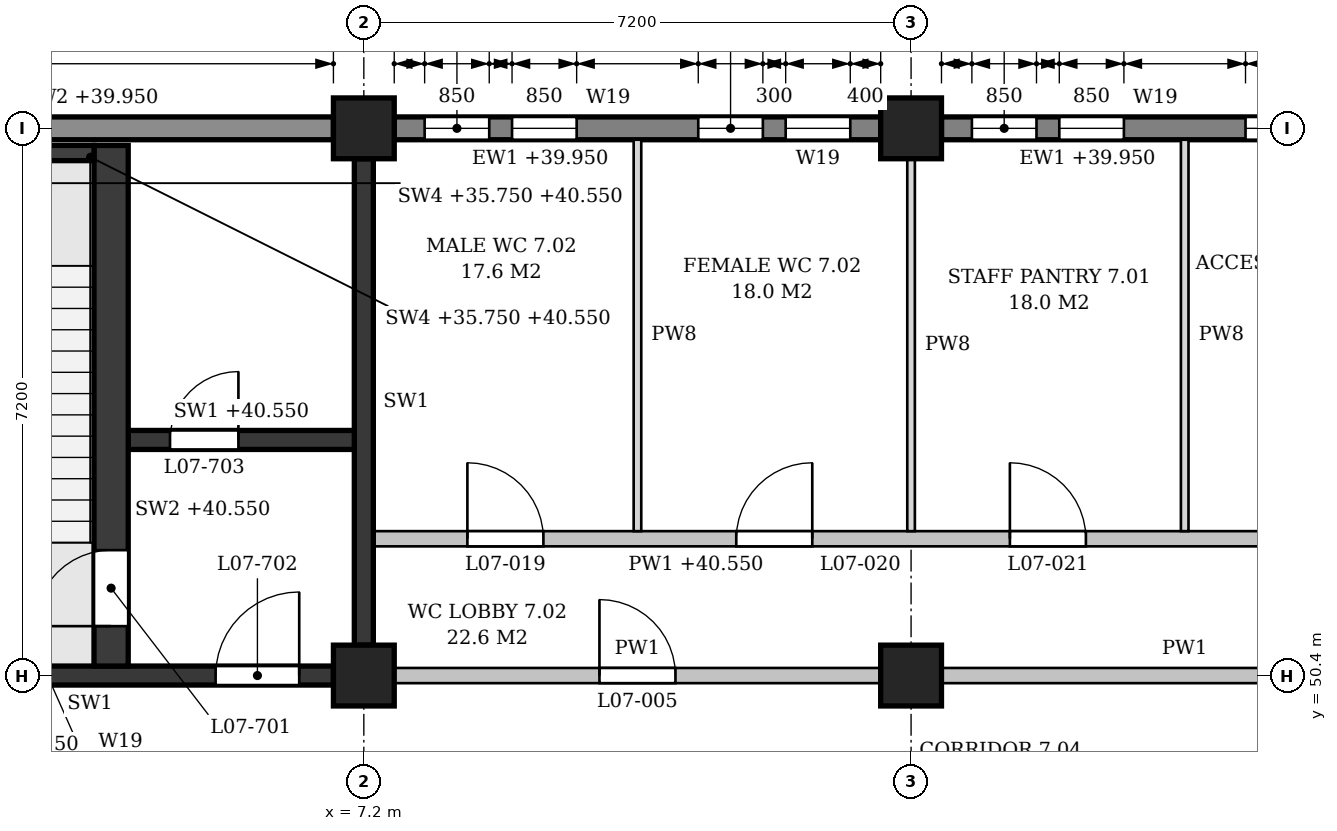
"""IFC4 building model, lengths in metres.
Left out: names, types, materials, properties, quantities, classifications, styles, units other than length and angle.
Written with IfcOpenShell. Run it as: python <this file> out.ifc"""

import sys

from ifc_helpers import new_model, si_unit, direction, frame, frame_2d, origin, origin_2d, place, context, subcontext, project, spatial, polyline, rectangle, outline, extrude, element, fill, save


model = new_model("IFC4")
c1 = context("Model", 3, precision=1e-05, world=origin(), true_north=direction((0.0, 1.0)))
c2 = subcontext(c1, "Body", "Model", "MODEL_VIEW")
j1 = project(units=[si_unit("LENGTHUNIT", "METRE"), si_unit("PLANEANGLEUNIT", "RADIAN")], contexts=[c1])
p1 = place(None, origin())
s1 = spatial("IfcSite", under=j1, at=p1, CompositionType="ELEMENT")
p2 = place(p1, origin())
s2 = spatial("IfcBuilding", under=s1, at=p2, CompositionType="ELEMENT")
p3 = place(p2, frame((0.0, 0.0, 36.0)))
s3 = spatial("IfcBuildingStorey", under=s2, at=p3, CompositionType="ELEMENT", Elevation=36.0)
for number, where, z_axis, x_axis in (
    (1, (7.2, 50.4, 0.0), (0.0, 0.0, 1.0), (1.0, 0.0, 0.0)),
    (2, (7.2, 57.6, 0.0), (0.0, 0.0, 1.0), (1.0, 0.0, 0.0)),
    (3, (14.4, 50.4, 0.0), (0.0, 0.0, 1.0), (1.0, 0.0, 0.0)),
    (4, (14.4, 57.6, 0.0), (0.0, 0.0, 1.0), (1.0, 0.0, 0.0)),
):
    element("IfcColumn", number, at=place(p3, frame(where, z_axis=z_axis, x_axis=x_axis)), inside=s3, PredefinedType="COLUMN", context=c2, shape_type="SweptSolid", body=[
        extrude(rectangle(XDim=0.8, YDim=0.8, at=origin_2d()), origin(), (0.0, 0.0, 1.0), 4.8),
    ])
p4 = place(p3, frame((21.2, 57.6, 0.0), z_axis=(0.0, 0.0, 1.0), x_axis=(-1.0, 0.0, 0.0)))
e5 = element("IfcWall", 5, at=p4, inside=s3, PredefinedType="STANDARD", context=c2, shape_type="SweptSolid", body=[
    extrude(rectangle(XDim=6.4, YDim=0.3, at=frame_2d((3.2, 0.0))), origin(), (0.0, 0.0, 1.0), 3.95),
])
p5 = place(p4, frame((0.4, 0.0, 0.9)))
e6 = element("IfcOpeningElement", 6, at=p5, cuts=e5, PredefinedType="OPENING", context=c2, shape_type="SweptSolid", body=[
    extrude(outline(polyline([(0.0, 0.0), (0.85, 0.0), (0.85, 2.55), (0.425, 3.0), (0.0, 2.55), (0.0, 0.0)])), frame((0.0, 0.16, 0.0), z_axis=(0.0, -1.0, 0.0), x_axis=(1.0, 0.0, 0.0)), (0.0, 0.0, 1.0), 0.32),
])
p6 = place(p4, frame((1.55, 0.0, 0.9)))
e7 = element("IfcOpeningElement", 7, at=p6, cuts=e5, PredefinedType="OPENING", context=c2, shape_type="SweptSolid", body=[
    extrude(outline(polyline([(0.0, 0.0), (0.85, 0.0), (0.85, 2.55), (0.425, 3.0), (0.0, 2.55), (0.0, 0.0)])), frame((0.0, 0.16, 0.0), z_axis=(0.0, -1.0, 0.0), x_axis=(1.0, 0.0, 0.0)), (0.0, 0.0, 1.0), 0.32),
])
p7 = place(p4, frame((4.0, 0.0, 0.9)))
e8 = element("IfcOpeningElement", 8, at=p7, cuts=e5, PredefinedType="OPENING", context=c2, shape_type="SweptSolid", body=[
    extrude(outline(polyline([(0.0, 0.0), (0.85, 0.0), (0.85, 2.55), (0.425, 3.0), (0.0, 2.55), (0.0, 0.0)])), frame((0.0, 0.16, 0.0), z_axis=(0.0, -1.0, 0.0), x_axis=(1.0, 0.0, 0.0)), (0.0, 0.0, 1.0), 0.32),
])
p8 = place(p4, frame((5.15, 0.0, 0.9)))
e9 = element("IfcOpeningElement", 9, at=p8, cuts=e5, PredefinedType="OPENING", context=c2, shape_type="SweptSolid", body=[
    extrude(outline(polyline([(0.0, 0.0), (0.85, 0.0), (0.85, 2.55), (0.425, 3.0), (0.0, 2.55), (0.0, 0.0)])), frame((0.0, 0.16, 0.0), z_axis=(0.0, -1.0, 0.0), x_axis=(1.0, 0.0, 0.0)), (0.0, 0.0, 1.0), 0.32),
])
p9 = place(p3, frame((14.0, 57.6, 0.0), z_axis=(0.0, 0.0, 1.0), x_axis=(-1.0, 0.0, 0.0)))
e10 = element("IfcWall", 10, at=p9, inside=s3, PredefinedType="STANDARD", context=c2, shape_type="SweptSolid", body=[
    extrude(rectangle(XDim=6.4, YDim=0.3, at=frame_2d((3.2, 0.0))), origin(), (0.0, 0.0, 1.0), 3.95),
])
p10 = place(p9, frame((0.4, 0.0, 0.9)))
e11 = element("IfcOpeningElement", 11, at=p10, cuts=e10, PredefinedType="OPENING", context=c2, shape_type="SweptSolid", body=[
    extrude(outline(polyline([(0.0, 0.0), (0.85, 0.0), (0.85, 2.55), (0.425, 3.0), (0.0, 2.55), (0.0, 0.0)])), frame((0.0, 0.16, 0.0), z_axis=(0.0, -1.0, 0.0), x_axis=(1.0, 0.0, 0.0)), (0.0, 0.0, 1.0), 0.32),
])
p11 = place(p9, frame((1.55, 0.0, 0.9)))
e12 = element("IfcOpeningElement", 12, at=p11, cuts=e10, PredefinedType="OPENING", context=c2, shape_type="SweptSolid", body=[
    extrude(outline(polyline([(0.0, 0.0), (0.85, 0.0), (0.85, 2.55), (0.425, 3.0), (0.0, 2.55), (0.0, 0.0)])), frame((0.0, 0.16, 0.0), z_axis=(0.0, -1.0, 0.0), x_axis=(1.0, 0.0, 0.0)), (0.0, 0.0, 1.0), 0.32),
])
p12 = place(p9, frame((4.0, 0.0, 0.9)))
e13 = element("IfcOpeningElement", 13, at=p12, cuts=e10, PredefinedType="OPENING", context=c2, shape_type="SweptSolid", body=[
    extrude(outline(polyline([(0.0, 0.0), (0.85, 0.0), (0.85, 2.55), (0.425, 3.0), (0.0, 2.55), (0.0, 0.0)])), frame((0.0, 0.16, 0.0), z_axis=(0.0, -1.0, 0.0), x_axis=(1.0, 0.0, 0.0)), (0.0, 0.0, 1.0), 0.32),
])
p13 = place(p9, frame((5.15, 0.0, 0.9)))
e14 = element("IfcOpeningElement", 14, at=p13, cuts=e10, PredefinedType="OPENING", context=c2, shape_type="SweptSolid", body=[
    extrude(outline(polyline([(0.0, 0.0), (0.85, 0.0), (0.85, 2.55), (0.425, 3.0), (0.0, 2.55), (0.0, 0.0)])), frame((0.0, 0.16, 0.0), z_axis=(0.0, -1.0, 0.0), x_axis=(1.0, 0.0, 0.0)), (0.0, 0.0, 1.0), 0.32),
])
p14 = place(p3, frame((6.8, 57.6, 0.0), z_axis=(0.0, 0.0, 1.0), x_axis=(-1.0, 0.0, 0.0)))
e15 = element("IfcWall", 15, at=p14, inside=s3, PredefinedType="STANDARD", context=c2, shape_type="SweptSolid", body=[
    extrude(rectangle(XDim=6.4, YDim=0.3, at=frame_2d((3.2, 0.0))), origin(), (0.0, 0.0, 1.0), 3.95),
])
p15 = place(p14, frame((4.55, 0.0, 0.9)))
e16 = element("IfcOpeningElement", 16, at=p15, cuts=e15, PredefinedType="OPENING", context=c2, shape_type="SweptSolid", body=[
    extrude(outline(polyline([(0.0, 0.0), (0.9, 0.0), (0.9, 2.55), (0.45, 3.0), (0.0, 2.55), (0.0, 0.0)])), frame((0.0, 0.16, 0.0), z_axis=(0.0, -1.0, 0.0), x_axis=(1.0, 0.0, 0.0)), (0.0, 0.0, 1.0), 0.32),
])
p16 = place(p3, frame((0.4, 50.4, 0.0), z_axis=(0.0, 0.0, 1.0), x_axis=(1.0, 0.0, 0.0)))
e17 = element("IfcWall", 17, at=p16, inside=s3, PredefinedType="SHEAR", context=c2, shape_type="SweptSolid", body=[
    extrude(rectangle(XDim=6.4, YDim=0.25, at=frame_2d((3.2, 0.0))), origin(), (0.0, 0.0, 1.0), 3.85),
])
p17 = place(p16, frame((4.85, 0.0, 0.0)))
e18 = element("IfcOpeningElement", 18, at=p17, cuts=e17, PredefinedType="OPENING", context=c2, shape_type="SweptSolid", body=[
    extrude(rectangle(XDim=1.1, YDim=2.1, at=frame_2d((0.55, 1.05))), frame((0.0, 0.135, 0.0), z_axis=(0.0, -1.0, 0.0), x_axis=(1.0, 0.0, 0.0)), (0.0, 0.0, 1.0), 0.27),
])
p18 = place(p3, frame((7.2, 50.8, 0.0), z_axis=(0.0, 0.0, 1.0), x_axis=(0.0, 1.0, 0.0)))
e19 = element("IfcWall", 19, at=p18, inside=s3, PredefinedType="SHEAR", context=c2, shape_type="SweptSolid", body=[
    extrude(rectangle(XDim=6.4, YDim=0.25, at=frame_2d((3.2, 0.0))), origin(), (0.0, 0.0, 1.0), 3.85),
])
p19 = place(p3, frame((2.25, 57.275, -0.25), z_axis=(0.0, 0.0, 1.0), x_axis=(1.0, 0.0, 0.0)))
e20 = element("IfcWall", 20, at=p19, inside=s3, PredefinedType="SHEAR", context=c2, shape_type="SweptSolid", body=[
    extrude(rectangle(XDim=1.4, YDim=0.2, at=frame_2d((0.7, 0.0))), origin(), (0.0, 0.0, 1.0), 4.8),
])
p20 = place(p3, frame((3.875, 50.525, 0.0), z_axis=(0.0, 0.0, 1.0), x_axis=(0.0, 1.0, 0.0)))
e21 = element("IfcWall", 21, at=p20, inside=s3, PredefinedType="SHEAR", context=c2, shape_type="SweptSolid", body=[
    extrude(rectangle(XDim=6.85, YDim=0.45, at=frame_2d((3.425, 0.0))), origin(), (0.0, 0.0, 1.0), 4.55),
])
p21 = place(p20, frame((0.525, 0.0, 0.0)))
e22 = element("IfcOpeningElement", 22, at=p21, cuts=e21, PredefinedType="OPENING", context=c2, shape_type="SweptSolid", body=[
    extrude(rectangle(XDim=1.0, YDim=2.1, at=frame_2d((0.5, 1.05))), frame((0.0, 0.235, 0.0), z_axis=(0.0, -1.0, 0.0), x_axis=(1.0, 0.0, 0.0)), (0.0, 0.0, 1.0), 0.47),
])
p22 = place(p3, frame((4.1, 53.5, 0.0), z_axis=(0.0, 0.0, 1.0), x_axis=(1.0, 0.0, 0.0)))
e23 = element("IfcWall", 23, at=p22, inside=s3, PredefinedType="SHEAR", context=c2, shape_type="SweptSolid", body=[
    extrude(rectangle(XDim=2.975, YDim=0.25, at=frame_2d((1.487, 0.0))), origin(), (0.0, 0.0, 1.0), 4.55),
])
p23 = place(p22, frame((0.55, 0.0, 0.0)))
e24 = element("IfcOpeningElement", 24, at=p23, cuts=e23, PredefinedType="OPENING", context=c2, shape_type="SweptSolid", body=[
    extrude(rectangle(XDim=0.9, YDim=2.1, at=frame_2d((0.45, 1.05))), frame((0.0, 0.135, 0.0), z_axis=(0.0, -1.0, 0.0), x_axis=(1.0, 0.0, 0.0)), (0.0, 0.0, 1.0), 0.27),
])
p24 = place(p3, frame((7.6, 50.4, 0.0), z_axis=(0.0, 0.0, 1.0), x_axis=(1.0, 0.0, 0.0)))
e25 = element("IfcWall", 25, at=p24, inside=s3, PredefinedType="PARTITIONING", context=c2, shape_type="SweptSolid", body=[
    extrude(rectangle(XDim=6.4, YDim=0.2, at=frame_2d((3.2, 0.0))), origin(), (0.0, 0.0, 1.0), 3.85),
])
p25 = place(p24, frame((2.7, 0.0, 0.0)))
e26 = element("IfcOpeningElement", 26, at=p25, cuts=e25, PredefinedType="OPENING", context=c2, shape_type="SweptSolid", body=[
    extrude(rectangle(XDim=1.0, YDim=2.1, at=frame_2d((0.5, 1.05))), frame((0.0, 0.11, 0.0), z_axis=(0.0, -1.0, 0.0), x_axis=(1.0, 0.0, 0.0)), (0.0, 0.0, 1.0), 0.22),
])
p26 = place(p3, frame((14.8, 50.4, 0.0), z_axis=(0.0, 0.0, 1.0), x_axis=(1.0, 0.0, 0.0)))
e27 = element("IfcWall", 27, at=p26, inside=s3, PredefinedType="PARTITIONING", context=c2, shape_type="SweptSolid", body=[
    extrude(rectangle(XDim=6.4, YDim=0.2, at=frame_2d((3.2, 0.0))), origin(), (0.0, 0.0, 1.0), 3.85),
])
p27 = place(p26, frame((4.3, 0.0, 0.0)))
e28 = element("IfcOpeningElement", 28, at=p27, cuts=e27, PredefinedType="OPENING", context=c2, shape_type="SweptSolid", body=[
    extrude(rectangle(XDim=1.0, YDim=2.1, at=frame_2d((0.5, 1.05))), frame((0.0, 0.11, 0.0), z_axis=(0.0, -1.0, 0.0), x_axis=(1.0, 0.0, 0.0)), (0.0, 0.0, 1.0), 0.22),
])
p28 = place(p3, frame((7.325, 52.2, 0.0), z_axis=(0.0, 0.0, 1.0), x_axis=(1.0, 0.0, 0.0)))
e29 = element("IfcWall", 29, at=p28, inside=s3, PredefinedType="PARTITIONING", context=c2, shape_type="SweptSolid", body=[
    extrude(outline(polyline([(0.0, 0.0), (14.15, 0.0), (14.15, 3.85), (14.05, 3.85), (14.05, 4.55), (7.3, 4.55), (7.3, 3.85), (6.85, 3.85), (6.85, 4.55), (0.1, 4.55), (0.1, 3.85), (0.0, 3.85), (0.0, 0.0)])), frame((0.0, 0.1, 0.0), z_axis=(0.0, -1.0, 0.0), x_axis=(1.0, 0.0, 0.0)), (0.0, 0.0, 1.0), 0.2),
])
p29 = place(p28, frame((1.238, 0.0, 0.0)))
e30 = element("IfcOpeningElement", 30, at=p29, cuts=e29, PredefinedType="OPENING", context=c2, shape_type="SweptSolid", body=[
    extrude(rectangle(XDim=1.0, YDim=2.1, at=frame_2d((0.5, 1.05))), frame((0.0, 0.11, 0.0), z_axis=(0.0, -1.0, 0.0), x_axis=(1.0, 0.0, 0.0)), (0.0, 0.0, 1.0), 0.22),
])
p30 = place(p28, frame((4.775, 0.0, 0.0)))
e31 = element("IfcOpeningElement", 31, at=p30, cuts=e29, PredefinedType="OPENING", context=c2, shape_type="SweptSolid", body=[
    extrude(rectangle(XDim=1.0, YDim=2.1, at=frame_2d((0.5, 1.05))), frame((0.0, 0.11, 0.0), z_axis=(0.0, -1.0, 0.0), x_axis=(1.0, 0.0, 0.0)), (0.0, 0.0, 1.0), 0.22),
])
p31 = place(p28, frame((8.375, 0.0, 0.0)))
e32 = element("IfcOpeningElement", 32, at=p31, cuts=e29, PredefinedType="OPENING", context=c2, shape_type="SweptSolid", body=[
    extrude(rectangle(XDim=1.0, YDim=2.1, at=frame_2d((0.5, 1.05))), frame((0.0, 0.11, 0.0), z_axis=(0.0, -1.0, 0.0), x_axis=(1.0, 0.0, 0.0)), (0.0, 0.0, 1.0), 0.22),
])
p32 = place(p28, frame((11.913, 0.0, 0.0)))
e33 = element("IfcOpeningElement", 33, at=p32, cuts=e29, PredefinedType="OPENING", context=c2, shape_type="SweptSolid", body=[
    extrude(rectangle(XDim=1.0, YDim=2.1, at=frame_2d((0.5, 1.05))), frame((0.0, 0.11, 0.0), z_axis=(0.0, -1.0, 0.0), x_axis=(1.0, 0.0, 0.0)), (0.0, 0.0, 1.0), 0.22),
])
p33 = place(p3, frame((10.8, 52.3, 0.0), z_axis=(0.0, 0.0, 1.0), x_axis=(0.0, 1.0, 0.0)))
e34 = element("IfcWall", 34, at=p33, inside=s3, PredefinedType="PARTITIONING", context=c2, shape_type="SweptSolid", body=[
    extrude(rectangle(XDim=5.15, YDim=0.1, at=frame_2d((2.575, 0.0))), origin(), (0.0, 0.0, 1.0), 3.85),
])
p34 = place(p3, frame((14.4, 52.3, 0.0), z_axis=(0.0, 0.0, 1.0), x_axis=(0.0, 1.0, 0.0)))
e35 = element("IfcWall", 35, at=p34, inside=s3, PredefinedType="PARTITIONING", context=c2, shape_type="SweptSolid", body=[
    extrude(rectangle(XDim=4.9, YDim=0.1, at=frame_2d((2.45, 0.0))), origin(), (0.0, 0.0, 1.0), 3.85),
])
p35 = place(p3, frame((18.0, 52.3, 0.0), z_axis=(0.0, 0.0, 1.0), x_axis=(0.0, 1.0, 0.0)))
e36 = element("IfcWall", 36, at=p35, inside=s3, PredefinedType="PARTITIONING", context=c2, shape_type="SweptSolid", body=[
    extrude(rectangle(XDim=5.15, YDim=0.1, at=frame_2d((2.575, 0.0))), origin(), (0.0, 0.0, 1.0), 3.85),
])
p36 = place(p6, origin())
e37 = element("IfcWindow", 37, at=p36, inside=s3, PartitioningType="SINGLE_PANEL", PredefinedType="WINDOW", context=c2, shape_type="SweptSolid", body=[
    extrude(outline(polyline([(0.0, 0.0), (0.85, 0.0), (0.85, 2.55), (0.425, 3.0), (0.0, 2.55), (0.0, 0.0)])), frame((0.0, 0.03, 0.0), z_axis=(0.0, -1.0, 0.0), x_axis=(1.0, 0.0, 0.0)), (0.0, 0.0, 1.0), 0.06),
])
fill(e7, e37)
p37 = place(p7, origin())
e38 = element("IfcWindow", 38, at=p37, inside=s3, PartitioningType="SINGLE_PANEL", PredefinedType="WINDOW", context=c2, shape_type="SweptSolid", body=[
    extrude(outline(polyline([(0.0, 0.0), (0.85, 0.0), (0.85, 2.55), (0.425, 3.0), (0.0, 2.55), (0.0, 0.0)])), frame((0.0, 0.03, 0.0), z_axis=(0.0, -1.0, 0.0), x_axis=(1.0, 0.0, 0.0)), (0.0, 0.0, 1.0), 0.06),
])
fill(e8, e38)
p38 = place(p8, origin())
e39 = element("IfcWindow", 39, at=p38, inside=s3, PartitioningType="SINGLE_PANEL", PredefinedType="WINDOW", context=c2, shape_type="SweptSolid", body=[
    extrude(outline(polyline([(0.0, 0.0), (0.85, 0.0), (0.85, 2.55), (0.425, 3.0), (0.0, 2.55), (0.0, 0.0)])), frame((0.0, 0.03, 0.0), z_axis=(0.0, -1.0, 0.0), x_axis=(1.0, 0.0, 0.0)), (0.0, 0.0, 1.0), 0.06),
])
fill(e9, e39)
p39 = place(p10, origin())
e40 = element("IfcWindow", 40, at=p39, inside=s3, PartitioningType="SINGLE_PANEL", PredefinedType="WINDOW", context=c2, shape_type="SweptSolid", body=[
    extrude(outline(polyline([(0.0, 0.0), (0.85, 0.0), (0.85, 2.55), (0.425, 3.0), (0.0, 2.55), (0.0, 0.0)])), frame((0.0, 0.03, 0.0), z_axis=(0.0, -1.0, 0.0), x_axis=(1.0, 0.0, 0.0)), (0.0, 0.0, 1.0), 0.06),
])
fill(e11, e40)
p40 = place(p11, origin())
e41 = element("IfcWindow", 41, at=p40, inside=s3, PartitioningType="SINGLE_PANEL", PredefinedType="WINDOW", context=c2, shape_type="SweptSolid", body=[
    extrude(outline(polyline([(0.0, 0.0), (0.85, 0.0), (0.85, 2.55), (0.425, 3.0), (0.0, 2.55), (0.0, 0.0)])), frame((0.0, 0.03, 0.0), z_axis=(0.0, -1.0, 0.0), x_axis=(1.0, 0.0, 0.0)), (0.0, 0.0, 1.0), 0.06),
])
fill(e12, e41)
p41 = place(p12, origin())
e42 = element("IfcWindow", 42, at=p41, inside=s3, PartitioningType="SINGLE_PANEL", PredefinedType="WINDOW", context=c2, shape_type="SweptSolid", body=[
    extrude(outline(polyline([(0.0, 0.0), (0.85, 0.0), (0.85, 2.55), (0.425, 3.0), (0.0, 2.55), (0.0, 0.0)])), frame((0.0, 0.03, 0.0), z_axis=(0.0, -1.0, 0.0), x_axis=(1.0, 0.0, 0.0)), (0.0, 0.0, 1.0), 0.06),
])
fill(e13, e42)
p42 = place(p13, origin())
e43 = element("IfcWindow", 43, at=p42, inside=s3, PartitioningType="SINGLE_PANEL", PredefinedType="WINDOW", context=c2, shape_type="SweptSolid", body=[
    extrude(outline(polyline([(0.0, 0.0), (0.85, 0.0), (0.85, 2.55), (0.425, 3.0), (0.0, 2.55), (0.0, 0.0)])), frame((0.0, 0.03, 0.0), z_axis=(0.0, -1.0, 0.0), x_axis=(1.0, 0.0, 0.0)), (0.0, 0.0, 1.0), 0.06),
])
fill(e14, e43)
p43 = place(p21, origin())
e44 = element("IfcDoor", 44, at=p43, inside=s3, OperationType="SINGLE_SWING_LEFT", PredefinedType="DOOR", context=c2, shape_type="SweptSolid", body=[
    extrude(rectangle(XDim=1.0, YDim=2.1, at=frame_2d((0.5, 1.05))), frame((0.0, 0.025, 0.0), z_axis=(0.0, -1.0, 0.0), x_axis=(1.0, 0.0, 0.0)), (0.0, 0.0, 1.0), 0.05),
])
fill(e22, e44)
p44 = place(p17, origin())
e45 = element("IfcDoor", 45, at=p44, inside=s3, OperationType="SINGLE_SWING_RIGHT", PredefinedType="DOOR", context=c2, shape_type="SweptSolid", body=[
    extrude(rectangle(XDim=1.1, YDim=2.1, at=frame_2d((0.55, 1.05))), frame((0.0, 0.025, 0.0), z_axis=(0.0, -1.0, 0.0), x_axis=(1.0, 0.0, 0.0)), (0.0, 0.0, 1.0), 0.05),
])
fill(e18, e45)
p45 = place(p23, origin())
e46 = element("IfcDoor", 46, at=p45, inside=s3, OperationType="SINGLE_SWING_RIGHT", PredefinedType="DOOR", context=c2, shape_type="SweptSolid", body=[
    extrude(rectangle(XDim=0.9, YDim=2.1, at=frame_2d((0.45, 1.05))), frame((0.0, 0.025, 0.0), z_axis=(0.0, -1.0, 0.0), x_axis=(1.0, 0.0, 0.0)), (0.0, 0.0, 1.0), 0.05),
])
fill(e24, e46)
p46 = place(p25, origin())
e47 = element("IfcDoor", 47, at=p46, inside=s3, OperationType="SINGLE_SWING_LEFT", PredefinedType="DOOR", context=c2, shape_type="SweptSolid", body=[
    extrude(rectangle(XDim=1.0, YDim=2.1, at=frame_2d((0.5, 1.05))), frame((0.0, 0.025, 0.0), z_axis=(0.0, -1.0, 0.0), x_axis=(1.0, 0.0, 0.0)), (0.0, 0.0, 1.0), 0.05),
])
fill(e26, e47)
p47 = place(p29, origin())
e48 = element("IfcDoor", 48, at=p47, inside=s3, OperationType="SINGLE_SWING_LEFT", PredefinedType="DOOR", context=c2, shape_type="SweptSolid", body=[
    extrude(rectangle(XDim=1.0, YDim=2.1, at=frame_2d((0.5, 1.05))), frame((0.0, 0.025, 0.0), z_axis=(0.0, -1.0, 0.0), x_axis=(1.0, 0.0, 0.0)), (0.0, 0.0, 1.0), 0.05),
])
fill(e30, e48)
p48 = place(p30, origin())
e49 = element("IfcDoor", 49, at=p48, inside=s3, OperationType="SINGLE_SWING_RIGHT", PredefinedType="DOOR", context=c2, shape_type="SweptSolid", body=[
    extrude(rectangle(XDim=1.0, YDim=2.1, at=frame_2d((0.5, 1.05))), frame((0.0, 0.025, 0.0), z_axis=(0.0, -1.0, 0.0), x_axis=(1.0, 0.0, 0.0)), (0.0, 0.0, 1.0), 0.05),
])
fill(e31, e49)
p49 = place(p31, origin())
e50 = element("IfcDoor", 50, at=p49, inside=s3, OperationType="SINGLE_SWING_LEFT", PredefinedType="DOOR", context=c2, shape_type="SweptSolid", body=[
    extrude(rectangle(XDim=1.0, YDim=2.1, at=frame_2d((0.5, 1.05))), frame((0.0, 0.025, 0.0), z_axis=(0.0, -1.0, 0.0), x_axis=(1.0, 0.0, 0.0)), (0.0, 0.0, 1.0), 0.05),
])
fill(e32, e50)
save(model, sys.argv[1])
